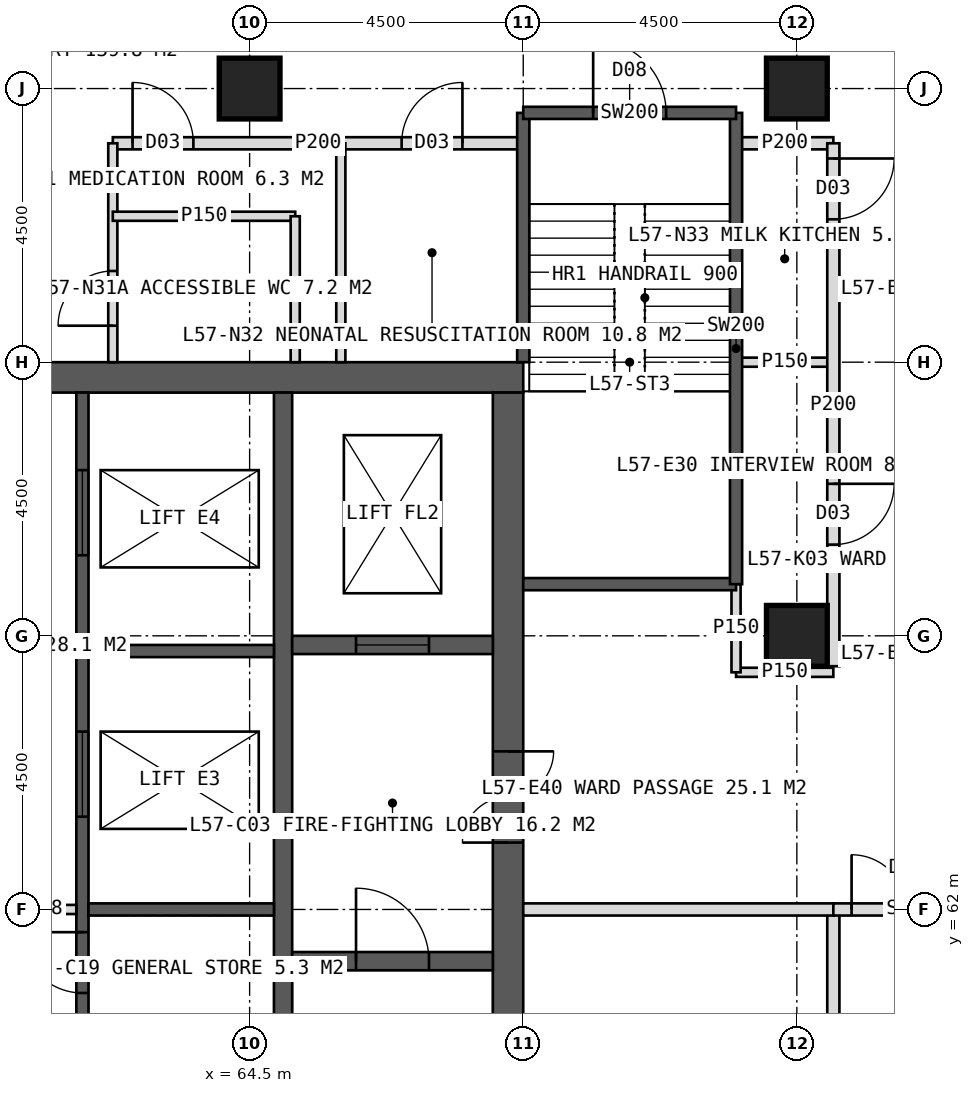
"""IFC4 building model, lengths in metres.
Left out: names, types, materials, properties, quantities, classifications, styles, units other than length and angle.
Written with IfcOpenShell. Run it as: python <this file> out.ifc"""

import sys

from ifc_helpers import new_model, si_unit, direction, frame, frame_2d, origin, origin_2d, place, context, subcontext, project, spatial, rectangle, hollow_rectangle, extrude, element, fill, save


model = new_model("IFC4")
c1 = context("Model", 3, precision=1e-05, world=origin(), true_north=direction((0.0, 1.0)))
c2 = subcontext(c1, "Body", "Model", "MODEL_VIEW")
j1 = project(units=[si_unit("LENGTHUNIT", "METRE"), si_unit("PLANEANGLEUNIT", "RADIAN")], contexts=[c1])
p1 = place(None, origin())
s1 = spatial("IfcSite", under=j1, at=p1, CompositionType="ELEMENT")
p2 = place(p1, origin())
s2 = spatial("IfcBuilding", under=s1, at=p2, CompositionType="ELEMENT")
p3 = place(p2, frame((0.0, 0.0, 237.0)))
s3 = spatial("IfcBuildingStorey", under=s2, at=p3, CompositionType="ELEMENT", Elevation=237.0)
p4 = place(p3, frame((51.0, 70.75, 0.0), z_axis=(0.0, 0.0, 1.0), x_axis=(1.0, 0.0, 0.0)))
e1 = element("IfcWall", 1, at=p4, inside=s3, PredefinedType="SHEAR", context=c2, shape_type="SweptSolid", body=[
    extrude(rectangle(XDim=18.0, YDim=0.5, at=frame_2d((9.0, 0.0))), origin(), (0.0, 0.0, 1.0), 4.0),
])
p5 = place(p4, frame((8.1, 0.0, 0.0)))
e2 = element("IfcOpeningElement", 2, at=p5, cuts=e1, PredefinedType="OPENING", context=c2, shape_type="SweptSolid", body=[
    extrude(rectangle(XDim=1.8, YDim=2.2, at=frame_2d((0.9, 1.1))), frame((0.0, 0.26, 0.0), z_axis=(0.0, -1.0, 0.0), x_axis=(1.0, 0.0, 0.0)), (0.0, 0.0, 1.0), 0.52),
])
p6 = place(p3, frame((68.75, 53.5, 0.0), z_axis=(0.0, 0.0, 1.0), x_axis=(0.0, 1.0, 0.0)))
e3 = element("IfcWall", 3, at=p6, inside=s3, PredefinedType="SHEAR", context=c2, shape_type="SweptSolid", body=[
    extrude(rectangle(XDim=17.0, YDim=0.5, at=frame_2d((8.5, 0.0))), origin(), (0.0, 0.0, 1.0), 4.0),
])
p7 = place(p6, frame((9.6, 0.0, 0.0)))
e4 = element("IfcOpeningElement", 4, at=p7, cuts=e3, PredefinedType="OPENING", context=c2, shape_type="SweptSolid", body=[
    extrude(rectangle(XDim=1.5, YDim=2.2, at=frame_2d((0.75, 1.1))), frame((0.0, 0.26, 0.0), z_axis=(0.0, -1.0, 0.0), x_axis=(1.0, 0.0, 0.0)), (0.0, 0.0, 1.0), 0.52),
])
p8 = place(p3, frame((65.05, 53.5, 0.0), z_axis=(0.0, 0.0, 1.0), x_axis=(0.0, 1.0, 0.0)))
e5 = element("IfcWall", 5, at=p8, inside=s3, PredefinedType="SHEAR", context=c2, shape_type="SweptSolid", body=[
    extrude(rectangle(XDim=17.0, YDim=0.3, at=frame_2d((8.5, 0.0))), origin(), (0.0, 0.0, 1.0), 4.0),
])
p9 = place(p3, frame((61.75, 53.5, 0.0), z_axis=(0.0, 0.0, 1.0), x_axis=(0.0, 1.0, 0.0)))
e6 = element("IfcWall", 6, at=p9, inside=s3, PredefinedType="SHEAR", context=c2, shape_type="SweptSolid", body=[
    extrude(rectangle(XDim=17.0, YDim=0.2, at=frame_2d((8.5, 0.0))), origin(), (0.0, 0.0, 1.0), 4.0),
])
p10 = place(p9, frame((0.496, 0.0, 0.0)))
e7 = element("IfcOpeningElement", 7, at=p10, cuts=e6, PredefinedType="OPENING", context=c2, shape_type="SweptSolid", body=[
    extrude(rectangle(XDim=1.0, YDim=2.1, at=frame_2d((0.5, 1.05))), frame((0.0, 0.11, 0.0), z_axis=(0.0, -1.0, 0.0), x_axis=(1.0, 0.0, 0.0)), (0.0, 0.0, 1.0), 0.22),
])
p11 = place(p9, frame((2.646, 0.0, 0.0)))
e8 = element("IfcOpeningElement", 8, at=p11, cuts=e6, PredefinedType="OPENING", context=c2, shape_type="SweptSolid", body=[
    extrude(rectangle(XDim=1.0, YDim=2.1, at=frame_2d((0.5, 1.05))), frame((0.0, 0.11, 0.0), z_axis=(0.0, -1.0, 0.0), x_axis=(1.0, 0.0, 0.0)), (0.0, 0.0, 1.0), 0.22),
])
p12 = place(p9, frame((5.027, 0.0, 0.0)))
e9 = element("IfcOpeningElement", 9, at=p12, cuts=e6, PredefinedType="OPENING", context=c2, shape_type="SweptSolid", body=[
    extrude(rectangle(XDim=1.0, YDim=2.1, at=frame_2d((0.5, 1.05))), frame((0.0, 0.11, 0.0), z_axis=(0.0, -1.0, 0.0), x_axis=(1.0, 0.0, 0.0)), (0.0, 0.0, 1.0), 0.22),
])
p13 = place(p9, frame((7.126, 0.0, 0.0)))
e10 = element("IfcOpeningElement", 10, at=p13, cuts=e6, PredefinedType="OPENING", context=c2, shape_type="SweptSolid", body=[
    extrude(rectangle(XDim=1.0, YDim=2.1, at=frame_2d((0.5, 1.05))), frame((0.0, 0.11, 0.0), z_axis=(0.0, -1.0, 0.0), x_axis=(1.0, 0.0, 0.0)), (0.0, 0.0, 1.0), 0.22),
])
p14 = place(p9, frame((10.025, 0.0, 0.0)))
e11 = element("IfcOpeningElement", 11, at=p14, cuts=e6, PredefinedType="OPENING", context=c2, shape_type="SweptSolid", body=[
    extrude(rectangle(XDim=1.4, YDim=2.2, at=frame_2d((0.7, 1.1))), frame((0.0, 0.11, 0.0), z_axis=(0.0, -1.0, 0.0), x_axis=(1.0, 0.0, 0.0)), (0.0, 0.0, 1.0), 0.22),
])
p15 = place(p9, frame((14.325, 0.0, 0.0)))
e12 = element("IfcOpeningElement", 12, at=p15, cuts=e6, PredefinedType="OPENING", context=c2, shape_type="SweptSolid", body=[
    extrude(rectangle(XDim=1.4, YDim=2.2, at=frame_2d((0.7, 1.1))), frame((0.0, 0.11, 0.0), z_axis=(0.0, -1.0, 0.0), x_axis=(1.0, 0.0, 0.0)), (0.0, 0.0, 1.0), 0.22),
])
for number, where, z_axis, x_axis in (
    (13, (61.85, 62.0, 0.0), (0.0, 0.0, 1.0), (1.0, 0.0, 0.0)),
    (14, (61.85, 66.25, 0.0), (0.0, 0.0, 1.0), (1.0, 0.0, 0.0)),
):
    element("IfcWall", number, at=place(p3, frame(where, z_axis=z_axis, x_axis=x_axis)), inside=s3, PredefinedType="SHEAR", context=c2, shape_type="SweptSolid", body=[
        extrude(rectangle(XDim=3.05, YDim=0.2, at=frame_2d((1.525, 0.0))), origin(), (0.0, 0.0, 1.0), 4.0),
    ])
p16 = place(p3, frame((65.2, 61.15, 0.0), z_axis=(0.0, 0.0, 1.0), x_axis=(1.0, 0.0, 0.0)))
e15 = element("IfcWall", 15, at=p16, inside=s3, PredefinedType="SHEAR", context=c2, shape_type="SweptSolid", body=[
    extrude(rectangle(XDim=3.3, YDim=0.3, at=frame_2d((1.65, 0.0))), origin(), (0.0, 0.0, 1.0), 4.0),
])
p17 = place(p16, frame((1.05, 0.0, 0.0)))
e16 = element("IfcOpeningElement", 16, at=p17, cuts=e15, PredefinedType="OPENING", context=c2, shape_type="SweptSolid", body=[
    extrude(rectangle(XDim=1.2, YDim=2.1, at=frame_2d((0.6, 1.05))), frame((0.0, 0.16, 0.0), z_axis=(0.0, -1.0, 0.0), x_axis=(1.0, 0.0, 0.0)), (0.0, 0.0, 1.0), 0.32),
])
p18 = place(p3, frame((65.2, 66.35, 0.0), z_axis=(0.0, 0.0, 1.0), x_axis=(1.0, 0.0, 0.0)))
e17 = element("IfcWall", 17, at=p18, inside=s3, PredefinedType="SHEAR", context=c2, shape_type="SweptSolid", body=[
    extrude(rectangle(XDim=3.3, YDim=0.3, at=frame_2d((1.65, 0.0))), origin(), (0.0, 0.0, 1.0), 4.0),
])
p19 = place(p18, frame((1.05, 0.0, 0.0)))
e18 = element("IfcOpeningElement", 18, at=p19, cuts=e17, PredefinedType="OPENING", context=c2, shape_type="SweptSolid", body=[
    extrude(rectangle(XDim=1.2, YDim=2.2, at=frame_2d((0.6, 1.1))), frame((0.0, 0.16, 0.0), z_axis=(0.0, -1.0, 0.0), x_axis=(1.0, 0.0, 0.0)), (0.0, 0.0, 1.0), 0.32),
])
for number, where, z_axis, x_axis in (
    (19, (73.5, 75.5, 0.0), (0.0, 0.0, 1.0), (1.0, 0.0, 0.0)),
    (20, (64.5, 75.5, 0.0), (0.0, 0.0, 1.0), (1.0, 0.0, 0.0)),
    (21, (73.5, 66.5, 0.0), (0.0, 0.0, 1.0), (1.0, 0.0, 0.0)),
):
    element("IfcColumn", number, at=place(p3, frame(where, z_axis=z_axis, x_axis=x_axis)), inside=s3, PredefinedType="COLUMN", context=c2, shape_type="SweptSolid", body=[
        extrude(hollow_rectangle(XDim=1.0, YDim=1.0, WallThickness=0.1, at=origin_2d()), origin(), (0.0, 0.0, 1.0), 4.0),
    ])
p20 = place(p3, frame((62.25, 74.6, 0.0), z_axis=(0.0, 0.0, 1.0), x_axis=(1.0, 0.0, 0.0)))
e22 = element("IfcWall", 22, at=p20, inside=s3, PredefinedType="PARTITIONING", context=c2, shape_type="SweptSolid", body=[
    extrude(rectangle(XDim=6.75, YDim=0.2, at=frame_2d((3.375, 0.0))), origin(), (0.0, 0.0, 1.0), 3.75),
])
p21 = place(p20, frame((0.325, 0.0, 0.0)))
e23 = element("IfcOpeningElement", 23, at=p21, cuts=e22, PredefinedType="OPENING", context=c2, shape_type="SweptSolid", body=[
    extrude(rectangle(XDim=1.0, YDim=2.1, at=frame_2d((0.5, 1.05))), frame((0.0, 0.11, 0.0), z_axis=(0.0, -1.0, 0.0), x_axis=(1.0, 0.0, 0.0)), (0.0, 0.0, 1.0), 0.22),
])
p22 = place(p20, frame((4.75, 0.0, 0.0)))
e24 = element("IfcOpeningElement", 24, at=p22, cuts=e22, PredefinedType="OPENING", context=c2, shape_type="SweptSolid", body=[
    extrude(rectangle(XDim=1.0, YDim=2.1, at=frame_2d((0.5, 1.05))), frame((0.0, 0.11, 0.0), z_axis=(0.0, -1.0, 0.0), x_axis=(1.0, 0.0, 0.0)), (0.0, 0.0, 1.0), 0.22),
])
p23 = place(p3, frame((72.5, 74.6, 0.0), z_axis=(0.0, 0.0, 1.0), x_axis=(1.0, 0.0, 0.0)))
e25 = element("IfcWall", 25, at=p23, inside=s3, PredefinedType="PARTITIONING", context=c2, shape_type="SweptSolid", body=[
    extrude(rectangle(XDim=1.6, YDim=0.2, at=frame_2d((0.8, 0.0))), origin(), (0.0, 0.0, 1.0), 3.75),
])
p24 = place(p3, frame((62.25, 71.0, 0.0), z_axis=(0.0, 0.0, 1.0), x_axis=(0.0, 1.0, 0.0)))
e26 = element("IfcWall", 26, at=p24, inside=s3, PredefinedType="PARTITIONING", context=c2, shape_type="SweptSolid", body=[
    extrude(rectangle(XDim=3.6, YDim=0.15, at=frame_2d((1.8, 0.0))), origin(), (0.0, 0.0, 1.0), 3.75),
])
p25 = place(p24, frame((0.6, 0.0, 0.0)))
e27 = element("IfcOpeningElement", 27, at=p25, cuts=e26, PredefinedType="OPENING", context=c2, shape_type="SweptSolid", body=[
    extrude(rectangle(XDim=0.9, YDim=2.1, at=frame_2d((0.45, 1.05))), frame((0.0, 0.085, 0.0), z_axis=(0.0, -1.0, 0.0), x_axis=(1.0, 0.0, 0.0)), (0.0, 0.0, 1.0), 0.17),
])
p26 = place(p3, frame((66.0, 71.0, 0.0), z_axis=(0.0, 0.0, 1.0), x_axis=(0.0, 1.0, 0.0)))
e28 = element("IfcWall", 28, at=p26, inside=s3, PredefinedType="PARTITIONING", context=c2, shape_type="SweptSolid", body=[
    extrude(rectangle(XDim=3.6, YDim=0.15, at=frame_2d((1.8, 0.0))), origin(), (0.0, 0.0, 1.0), 3.75),
])
p27 = place(p3, frame((62.25, 73.4, 0.0), z_axis=(0.0, 0.0, 1.0), x_axis=(1.0, 0.0, 0.0)))
e29 = element("IfcWall", 29, at=p27, inside=s3, PredefinedType="PARTITIONING", context=c2, shape_type="SweptSolid", body=[
    extrude(rectangle(XDim=3.0, YDim=0.15, at=frame_2d((1.5, 0.0))), origin(), (0.0, 0.0, 1.0), 3.75),
])
p28 = place(p3, frame((65.25, 71.0, 0.0), z_axis=(0.0, 0.0, 1.0), x_axis=(0.0, 1.0, 0.0)))
e30 = element("IfcWall", 30, at=p28, inside=s3, PredefinedType="PARTITIONING", context=c2, shape_type="SweptSolid", body=[
    extrude(rectangle(XDim=2.4, YDim=0.15, at=frame_2d((1.2, 0.0))), origin(), (0.0, 0.0, 1.0), 3.75),
])
p29 = place(p3, frame((72.5, 71.0, 0.0), z_axis=(0.0, 0.0, 1.0), x_axis=(1.0, 0.0, 0.0)))
e31 = element("IfcWall", 31, at=p29, inside=s3, PredefinedType="PARTITIONING", context=c2, shape_type="SweptSolid", body=[
    extrude(rectangle(XDim=1.6, YDim=0.15, at=frame_2d((0.8, 0.0))), origin(), (0.0, 0.0, 1.0), 3.75),
])
p30 = place(p3, frame((74.1, 74.6, 0.0), z_axis=(0.0, 0.0, 1.0), x_axis=(0.0, -1.0, 0.0)))
e32 = element("IfcWall", 32, at=p30, inside=s3, PredefinedType="PARTITIONING", context=c2, shape_type="SweptSolid", body=[
    extrude(rectangle(XDim=8.6, YDim=0.2, at=frame_2d((4.3, 0.0))), origin(), (0.0, 0.0, 1.0), 3.75),
])
p31 = place(p30, frame((0.25, 0.0, 0.0)))
e33 = element("IfcOpeningElement", 33, at=p31, cuts=e32, PredefinedType="OPENING", context=c2, shape_type="SweptSolid", body=[
    extrude(rectangle(XDim=1.0, YDim=2.1, at=frame_2d((0.5, 1.05))), frame((0.0, 0.11, 0.0), z_axis=(0.0, -1.0, 0.0), x_axis=(1.0, 0.0, 0.0)), (0.0, 0.0, 1.0), 0.22),
])
p32 = place(p30, frame((5.6, 0.0, 0.0)))
e34 = element("IfcOpeningElement", 34, at=p32, cuts=e32, PredefinedType="OPENING", context=c2, shape_type="SweptSolid", body=[
    extrude(rectangle(XDim=1.0, YDim=2.1, at=frame_2d((0.5, 1.05))), frame((0.0, 0.11, 0.0), z_axis=(0.0, -1.0, 0.0), x_axis=(1.0, 0.0, 0.0)), (0.0, 0.0, 1.0), 0.22),
])
p33 = place(p3, frame((74.1, 62.0, 0.0), z_axis=(0.0, 0.0, 1.0), x_axis=(0.0, -1.0, 0.0)))
e35 = element("IfcWall", 35, at=p33, inside=s3, PredefinedType="PARTITIONING", context=c2, shape_type="SweptSolid", body=[
    extrude(rectangle(XDim=14.1, YDim=0.2, at=frame_2d((7.05, 0.0))), origin(), (0.0, 0.0, 1.0), 3.75),
])
p34 = place(p33, frame((2.5, 0.0, 0.0)))
e36 = element("IfcOpeningElement", 36, at=p34, cuts=e35, PredefinedType="OPENING", context=c2, shape_type="SweptSolid", body=[
    extrude(rectangle(XDim=1.0, YDim=2.1, at=frame_2d((0.5, 1.05))), frame((0.0, 0.11, 0.0), z_axis=(0.0, -1.0, 0.0), x_axis=(1.0, 0.0, 0.0)), (0.0, 0.0, 1.0), 0.22),
])
p35 = place(p33, frame((7.0, 0.0, 0.0)))
e37 = element("IfcOpeningElement", 37, at=p35, cuts=e35, PredefinedType="OPENING", context=c2, shape_type="SweptSolid", body=[
    extrude(rectangle(XDim=1.0, YDim=2.1, at=frame_2d((0.5, 1.05))), frame((0.0, 0.11, 0.0), z_axis=(0.0, -1.0, 0.0), x_axis=(1.0, 0.0, 0.0)), (0.0, 0.0, 1.0), 0.22),
])
p36 = place(p33, frame((11.05, 0.0, 0.0)))
e38 = element("IfcOpeningElement", 38, at=p36, cuts=e35, PredefinedType="OPENING", context=c2, shape_type="SweptSolid", body=[
    extrude(rectangle(XDim=1.0, YDim=2.1, at=frame_2d((0.5, 1.05))), frame((0.0, 0.11, 0.0), z_axis=(0.0, -1.0, 0.0), x_axis=(1.0, 0.0, 0.0)), (0.0, 0.0, 1.0), 0.22),
])
p37 = place(p3, frame((72.5, 65.9, 0.0), z_axis=(0.0, 0.0, 1.0), x_axis=(1.0, 0.0, 0.0)))
e39 = element("IfcWall", 39, at=p37, inside=s3, PredefinedType="PARTITIONING", context=c2, shape_type="SweptSolid", body=[
    extrude(rectangle(XDim=1.6, YDim=0.15, at=frame_2d((0.8, 0.0))), origin(), (0.0, 0.0, 1.0), 3.75),
])
p38 = place(p3, frame((69.0, 62.0, 0.0), z_axis=(0.0, 0.0, 1.0), x_axis=(1.0, 0.0, 0.0)))
e40 = element("IfcWall", 40, at=p38, inside=s3, PredefinedType="SOLIDWALL", context=c2, shape_type="SweptSolid", body=[
    extrude(rectangle(XDim=5.1, YDim=0.2, at=frame_2d((2.55, 0.0))), origin(), (0.0, 0.0, 1.0), 2.95),
])
p39 = place(p3, frame((74.1, 62.0, 0.0), z_axis=(0.0, 0.0, 1.0), x_axis=(1.0, 0.0, 0.0)))
e41 = element("IfcWall", 41, at=p39, inside=s3, PredefinedType="SOLIDWALL", context=c2, shape_type="SweptSolid", body=[
    extrude(rectangle(XDim=2.7, YDim=0.2, at=frame_2d((1.35, 0.0))), origin(), (0.0, 0.0, 1.0), 2.95),
])
p40 = place(p39, frame((0.3, 0.0, 0.0)))
e42 = element("IfcOpeningElement", 42, at=p40, cuts=e41, PredefinedType="OPENING", context=c2, shape_type="SweptSolid", body=[
    extrude(rectangle(XDim=1.8, YDim=2.2, at=frame_2d((0.9, 1.1))), frame((0.0, 0.11, 0.0), z_axis=(0.0, -1.0, 0.0), x_axis=(1.0, 0.0, 0.0)), (0.0, 0.0, 1.0), 0.22),
])
p41 = place(p3, frame((58.35, 62.0, 0.0), z_axis=(0.0, 0.0, 1.0), x_axis=(1.0, 0.0, 0.0)))
e43 = element("IfcWall", 43, at=p41, inside=s3, PredefinedType="PARTITIONING", context=c2, shape_type="SweptSolid", body=[
    extrude(rectangle(XDim=3.3, YDim=0.15, at=frame_2d((1.65, 0.0))), origin(), (0.0, 0.0, 1.0), 3.75),
])
p42 = place(p3, frame((72.5, 65.9, 0.0), z_axis=(0.0, 0.0, 1.0), x_axis=(0.0, 1.0, 0.0)))
e44 = element("IfcWall", 44, at=p42, inside=s3, PredefinedType="PARTITIONING", context=c2, shape_type="SweptSolid", body=[
    extrude(rectangle(XDim=1.45, YDim=0.15, at=frame_2d((0.725, 0.0))), origin(), (0.0, 0.0, 1.0), 3.75),
])
p43 = place(p3, frame((69.0, 71.0, 0.0), z_axis=(0.0, 0.0, 1.0), x_axis=(0.0, 1.0, 0.0)))
e45 = element("IfcWall", 45, at=p43, inside=s3, PredefinedType="SOLIDWALL", context=c2, shape_type="SweptSolid", body=[
    extrude(rectangle(XDim=4.1, YDim=0.2, at=frame_2d((2.05, 0.0))), origin(), (0.0, 0.0, 1.0), 3.75),
])
p44 = place(p3, frame((69.0, 67.35, 0.0), z_axis=(0.0, 0.0, 1.0), x_axis=(1.0, 0.0, 0.0)))
e46 = element("IfcWall", 46, at=p44, inside=s3, PredefinedType="SOLIDWALL", context=c2, shape_type="SweptSolid", body=[
    extrude(rectangle(XDim=3.5, YDim=0.2, at=frame_2d((1.75, 0.0))), origin(), (0.0, 0.0, 1.0), 3.75),
])
p45 = place(p3, frame((72.5, 67.35, 0.0), z_axis=(0.0, 0.0, 1.0), x_axis=(0.0, 1.0, 0.0)))
e47 = element("IfcWall", 47, at=p45, inside=s3, PredefinedType="SOLIDWALL", context=c2, shape_type="SweptSolid", body=[
    extrude(rectangle(XDim=7.75, YDim=0.2, at=frame_2d((3.875, 0.0))), origin(), (0.0, 0.0, 1.0), 3.75),
])
p46 = place(p3, frame((69.0, 75.1, 0.0), z_axis=(0.0, 0.0, 1.0), x_axis=(1.0, 0.0, 0.0)))
e48 = element("IfcWall", 48, at=p46, inside=s3, PredefinedType="SOLIDWALL", context=c2, shape_type="SweptSolid", body=[
    extrude(rectangle(XDim=3.5, YDim=0.2, at=frame_2d((1.75, 0.0))), origin(), (0.0, 0.0, 1.0), 3.75),
])
p47 = place(p46, frame((1.15, 0.0, 0.0)))
e49 = element("IfcOpeningElement", 49, at=p47, cuts=e48, PredefinedType="OPENING", context=c2, shape_type="SweptSolid", body=[
    extrude(rectangle(XDim=1.2, YDim=2.1, at=frame_2d((0.6, 1.05))), frame((0.0, 0.11, 0.0), z_axis=(0.0, -1.0, 0.0), x_axis=(1.0, 0.0, 0.0)), (0.0, 0.0, 1.0), 0.22),
])
p48 = place(p25, origin())
e50 = element("IfcDoor", 50, at=p48, inside=s3, OperationType="SINGLE_SWING_LEFT", PredefinedType="DOOR", context=c2, shape_type="SweptSolid", body=[
    extrude(rectangle(XDim=0.9, YDim=2.1, at=frame_2d((0.45, 1.05))), frame((0.0, 0.025, 0.0), z_axis=(0.0, -1.0, 0.0), x_axis=(1.0, 0.0, 0.0)), (0.0, 0.0, 1.0), 0.05),
])
fill(e27, e50)
p49 = place(p21, origin())
e51 = element("IfcDoor", 51, at=p49, inside=s3, OperationType="SINGLE_SWING_LEFT", PredefinedType="DOOR", context=c2, shape_type="SweptSolid", body=[
    extrude(rectangle(XDim=1.0, YDim=2.1, at=frame_2d((0.5, 1.05))), frame((0.0, 0.025, 0.0), z_axis=(0.0, -1.0, 0.0), x_axis=(1.0, 0.0, 0.0)), (0.0, 0.0, 1.0), 0.05),
])
fill(e23, e51)
p50 = place(p22, origin())
e52 = element("IfcDoor", 52, at=p50, inside=s3, OperationType="SINGLE_SWING_RIGHT", PredefinedType="DOOR", context=c2, shape_type="SweptSolid", body=[
    extrude(rectangle(XDim=1.0, YDim=2.1, at=frame_2d((0.5, 1.05))), frame((0.0, 0.025, 0.0), z_axis=(0.0, -1.0, 0.0), x_axis=(1.0, 0.0, 0.0)), (0.0, 0.0, 1.0), 0.05),
])
fill(e24, e52)
p51 = place(p31, origin())
e53 = element("IfcDoor", 53, at=p51, inside=s3, OperationType="SINGLE_SWING_LEFT", PredefinedType="DOOR", context=c2, shape_type="SweptSolid", body=[
    extrude(rectangle(XDim=1.0, YDim=2.1, at=frame_2d((0.5, 1.05))), frame((0.0, 0.025, 0.0), z_axis=(0.0, -1.0, 0.0), x_axis=(1.0, 0.0, 0.0)), (0.0, 0.0, 1.0), 0.05),
])
fill(e33, e53)
p52 = place(p32, origin())
e54 = element("IfcDoor", 54, at=p52, inside=s3, OperationType="SINGLE_SWING_LEFT", PredefinedType="DOOR", context=c2, shape_type="SweptSolid", body=[
    extrude(rectangle(XDim=1.0, YDim=2.1, at=frame_2d((0.5, 1.05))), frame((0.0, 0.025, 0.0), z_axis=(0.0, -1.0, 0.0), x_axis=(1.0, 0.0, 0.0)), (0.0, 0.0, 1.0), 0.05),
])
fill(e34, e54)
p53 = place(p40, origin())
e55 = element("IfcDoor", 55, at=p53, inside=s3, OperationType="DOUBLE_DOOR_DOUBLE_SWING", PredefinedType="DOOR", context=c2, shape_type="SweptSolid", body=[
    extrude(rectangle(XDim=1.8, YDim=2.2, at=frame_2d((0.9, 1.1))), frame((0.0, 0.025, 0.0), z_axis=(0.0, -1.0, 0.0), x_axis=(1.0, 0.0, 0.0)), (0.0, 0.0, 1.0), 0.05),
])
fill(e42, e55)
p54 = place(p7, origin())
e56 = element("IfcDoor", 56, at=p54, inside=s3, OperationType="DOUBLE_DOOR_SINGLE_SWING", PredefinedType="DOOR", context=c2, shape_type="SweptSolid", body=[
    extrude(rectangle(XDim=1.5, YDim=2.2, at=frame_2d((0.75, 1.1))), frame((0.0, 0.025, 0.0), z_axis=(0.0, -1.0, 0.0), x_axis=(1.0, 0.0, 0.0)), (0.0, 0.0, 1.0), 0.05),
])
fill(e4, e56)
p55 = place(p17, origin())
e57 = element("IfcDoor", 57, at=p55, inside=s3, OperationType="SINGLE_SWING_LEFT", PredefinedType="DOOR", context=c2, shape_type="SweptSolid", body=[
    extrude(rectangle(XDim=1.2, YDim=2.1, at=frame_2d((0.6, 1.05))), frame((0.0, 0.025, 0.0), z_axis=(0.0, -1.0, 0.0), x_axis=(1.0, 0.0, 0.0)), (0.0, 0.0, 1.0), 0.05),
])
fill(e16, e57)
p56 = place(p19, origin())
e58 = element("IfcDoor", 58, at=p56, inside=s3, OperationType="SLIDING_TO_LEFT", PredefinedType="DOOR", context=c2, shape_type="SweptSolid", body=[
    extrude(rectangle(XDim=1.2, YDim=2.2, at=frame_2d((0.6, 1.1))), frame((0.0, 0.025, 0.0), z_axis=(0.0, -1.0, 0.0), x_axis=(1.0, 0.0, 0.0)), (0.0, 0.0, 1.0), 0.05),
])
fill(e18, e58)
p57 = place(p13, origin())
e59 = element("IfcDoor", 59, at=p57, inside=s3, OperationType="SINGLE_SWING_RIGHT", PredefinedType="DOOR", context=c2, shape_type="SweptSolid", body=[
    extrude(rectangle(XDim=1.0, YDim=2.1, at=frame_2d((0.5, 1.05))), frame((0.0, 0.025, 0.0), z_axis=(0.0, -1.0, 0.0), x_axis=(1.0, 0.0, 0.0)), (0.0, 0.0, 1.0), 0.05),
])
fill(e10, e59)
p58 = place(p14, origin())
e60 = element("IfcDoor", 60, at=p58, inside=s3, OperationType="SLIDING_TO_LEFT", PredefinedType="DOOR", context=c2, shape_type="SweptSolid", body=[
    extrude(rectangle(XDim=1.4, YDim=2.2, at=frame_2d((0.7, 1.1))), frame((0.0, 0.025, 0.0), z_axis=(0.0, -1.0, 0.0), x_axis=(1.0, 0.0, 0.0)), (0.0, 0.0, 1.0), 0.05),
])
fill(e11, e60)
p59 = place(p15, origin())
e61 = element("IfcDoor", 61, at=p59, inside=s3, OperationType="SLIDING_TO_LEFT", PredefinedType="DOOR", context=c2, shape_type="SweptSolid", body=[
    extrude(rectangle(XDim=1.4, YDim=2.2, at=frame_2d((0.7, 1.1))), frame((0.0, 0.025, 0.0), z_axis=(0.0, -1.0, 0.0), x_axis=(1.0, 0.0, 0.0)), (0.0, 0.0, 1.0), 0.05),
])
fill(e12, e61)
p60 = place(p47, origin())
e62 = element("IfcDoor", 62, at=p60, inside=s3, OperationType="SINGLE_SWING_LEFT", PredefinedType="DOOR", context=c2, shape_type="SweptSolid", body=[
    extrude(rectangle(XDim=1.2, YDim=2.1, at=frame_2d((0.6, 1.05))), frame((0.0, 0.025, 0.0), z_axis=(0.0, -1.0, 0.0), x_axis=(1.0, 0.0, 0.0)), (0.0, 0.0, 1.0), 0.05),
])
fill(e49, e62)
save(model, sys.argv[1])
